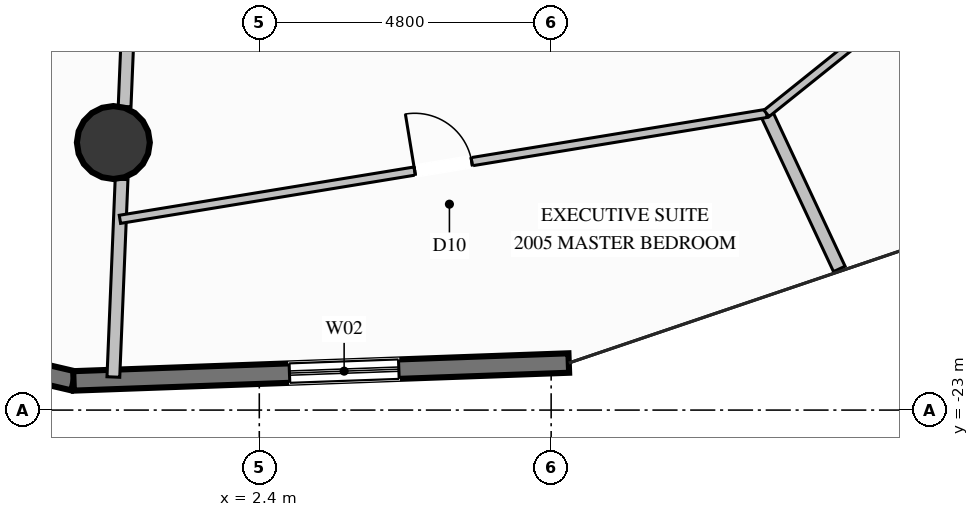
"""IFC4 building model, lengths in metres.
Left out: names, types, materials, properties, quantities, classifications, styles, units other than length and angle.
Written with IfcOpenShell. Run it as: python <this file> out.ifc"""

import sys

from ifc_helpers import new_model, si_unit, direction, frame, frame_2d, origin, origin_2d, place, context, subcontext, project, spatial, rectangle, circle, extrude, element, fill, save


model = new_model("IFC4")
c1 = context("Model", 3, precision=1e-05, world=origin(), true_north=direction((0.0, 1.0)))
c2 = subcontext(c1, "Body", "Model", "MODEL_VIEW")
j1 = project(units=[si_unit("LENGTHUNIT", "METRE"), si_unit("PLANEANGLEUNIT", "RADIAN")], contexts=[c1])
p1 = place(None, origin())
s1 = spatial("IfcSite", under=j1, at=p1, CompositionType="ELEMENT")
p2 = place(p1, origin())
s2 = spatial("IfcBuilding", under=s1, at=p2, CompositionType="ELEMENT")
p3 = place(p2, frame((0.0, 0.0, 75.2)))
s3 = spatial("IfcBuildingStorey", under=s2, at=p3, CompositionType="ELEMENT", Elevation=75.2)
p4 = place(p3, frame((0.0, -18.6, 0.0), z_axis=(0.0, 0.0, 1.0), x_axis=(1.0, 0.0, 0.0)))
e1 = element("IfcColumn", 1, at=p4, inside=s3, PredefinedType="COLUMN", context=c2, shape_type="SweptSolid", body=[
    extrude(circle(Radius=0.6, at=origin_2d()), origin(), (0.0, 0.0, 1.0), 3.6),
])
p5 = place(p3, frame((-0.655, -22.52, 0.0), z_axis=(0.0, 0.0, 1.0), x_axis=(-0.973849344218, 0.227194750746, 0.0)))
e2 = element("IfcWall", 2, at=p5, inside=s3, PredefinedType="SOLIDWALL", context=c2, shape_type="SweptSolid", body=[
    extrude(rectangle(XDim=8.412, YDim=0.32, at=frame_2d((4.206, 0.0))), origin(), (0.0, 0.0, 1.0), 3.34),
])
p6 = place(p5, frame((3.306, 0.0, 0.35)))
e3 = element("IfcOpeningElement", 3, at=p6, cuts=e2, PredefinedType="OPENING", context=c2, shape_type="SweptSolid", body=[
    extrude(rectangle(XDim=1.8, YDim=2.6, at=frame_2d((0.9, 1.3))), frame((0.0, 0.17, 0.0), z_axis=(0.0, -1.0, 0.0), x_axis=(1.0, 0.0, 0.0)), (0.0, 0.0, 1.0), 0.34),
])
p7 = place(p3, frame((7.49, -22.226, 0.0), z_axis=(0.0, 0.0, 1.0), x_axis=(-0.999349428773, -0.03606548505, 0.0)))
e4 = element("IfcWall", 4, at=p7, inside=s3, PredefinedType="SOLIDWALL", context=c2, shape_type="SweptSolid", body=[
    extrude(rectangle(XDim=8.15, YDim=0.32, at=frame_2d((4.075, 0.0))), origin(), (0.0, 0.0, 1.0), 3.34),
])
p8 = place(p7, frame((2.797, 0.0, 0.35)))
e5 = element("IfcOpeningElement", 5, at=p8, cuts=e4, PredefinedType="OPENING", context=c2, shape_type="SweptSolid", body=[
    extrude(rectangle(XDim=1.8, YDim=2.6, at=frame_2d((0.9, 1.3))), frame((0.0, 0.17, 0.0), z_axis=(0.0, -1.0, 0.0), x_axis=(1.0, 0.0, 0.0)), (0.0, 0.0, 1.0), 0.34),
])
p9 = place(p3, frame((0.45, -11.65, 0.0), z_axis=(0.0, 0.0, 1.0), x_axis=(-0.041625757429, -0.999133272551, 0.0)))
e6 = element("IfcWall", 6, at=p9, inside=s3, PredefinedType="PARTITIONING", context=c2, shape_type="SweptSolid", body=[
    extrude(rectangle(XDim=6.364, YDim=0.21, at=frame_2d((3.182, 0.0))), origin(), (0.0, 0.0, 1.0), 3.34),
])
p10 = place(p3, frame((0.135, -19.205, 0.0), z_axis=(0.0, 0.0, 1.0), x_axis=(-0.041493222314, -0.999138785406, 0.0)))
e7 = element("IfcWall", 7, at=p10, inside=s3, PredefinedType="PARTITIONING", context=c2, shape_type="SweptSolid", body=[
    extrude(rectangle(XDim=3.254, YDim=0.21, at=frame_2d((1.627, 0.0))), origin(), (0.0, 0.0, 1.0), 3.34),
])
p11 = place(p3, frame((10.742, -18.121, 0.0), z_axis=(0.0, 0.0, 1.0), x_axis=(0.423860139743, -0.905727653292, 0.0)))
e8 = element("IfcWall", 8, at=p11, inside=s3, PredefinedType="PARTITIONING", context=c2, shape_type="SweptSolid", body=[
    extrude(rectangle(XDim=2.824, YDim=0.21, at=frame_2d((1.412, 0.0))), origin(), (0.0, 0.0, 1.0), 3.34),
])
p12 = place(p3, frame((0.108, -19.863, 0.0), z_axis=(0.0, 0.0, 1.0), x_axis=(0.986847521354, 0.161653857356, 0.0)))
e9 = element("IfcWall", 9, at=p12, inside=s3, PredefinedType="PARTITIONING", context=c2, shape_type="SweptSolid", body=[
    extrude(rectangle(XDim=10.776, YDim=0.135, at=frame_2d((5.388, 0.0))), origin(), (0.0, 0.0, 1.0), 3.34),
])
p13 = place(p12, frame((4.913, 0.0, 0.0)))
e10 = element("IfcOpeningElement", 10, at=p13, cuts=e9, PredefinedType="OPENING", context=c2, shape_type="SweptSolid", body=[
    extrude(rectangle(XDim=0.95, YDim=2.1, at=frame_2d((0.475, 1.05))), frame((0.0, 0.078, 0.0), z_axis=(0.0, -1.0, 0.0), x_axis=(1.0, 0.0, 0.0)), (0.0, 0.0, 1.0), 0.155),
])
p14 = place(p3, frame((10.742, -18.121, 0.0), z_axis=(0.0, 0.0, 1.0), x_axis=(0.780032185097, 0.625739394807, 0.0)))
e11 = element("IfcWall", 11, at=p14, inside=s3, PredefinedType="PARTITIONING", context=c2, shape_type="SweptSolid", body=[
    extrude(rectangle(XDim=11.341, YDim=0.135, at=frame_2d((5.67, 0.0))), origin(), (0.0, 0.0, 1.0), 3.34),
])
p15 = place(p14, frame((5.195, 0.0, 0.0)))
e12 = element("IfcOpeningElement", 12, at=p15, cuts=e11, PredefinedType="OPENING", context=c2, shape_type="SweptSolid", body=[
    extrude(rectangle(XDim=0.95, YDim=2.1, at=frame_2d((0.475, 1.05))), frame((0.0, 0.078, 0.0), z_axis=(0.0, -1.0, 0.0), x_axis=(1.0, 0.0, 0.0)), (0.0, 0.0, 1.0), 0.155),
])
p16 = place(p8, origin())
e13 = element("IfcWindow", 13, at=p16, inside=s3, PartitioningType="SINGLE_PANEL", PredefinedType="WINDOW", context=c2, shape_type="SweptSolid", body=[
    extrude(rectangle(XDim=1.8, YDim=2.6, at=frame_2d((0.9, 1.3))), frame((0.0, 0.03, 0.0), z_axis=(0.0, -1.0, 0.0), x_axis=(1.0, 0.0, 0.0)), (0.0, 0.0, 1.0), 0.06),
])
fill(e5, e13)
p17 = place(p13, origin())
e14 = element("IfcDoor", 14, at=p17, inside=s3, OperationType="SINGLE_SWING_LEFT", PredefinedType="DOOR", context=c2, shape_type="SweptSolid", body=[
    extrude(rectangle(XDim=0.95, YDim=2.1, at=frame_2d((0.475, 1.05))), frame((0.0, 0.025, 0.0), z_axis=(0.0, -1.0, 0.0), x_axis=(1.0, 0.0, 0.0)), (0.0, 0.0, 1.0), 0.05),
])
fill(e10, e14)
save(model, sys.argv[1])
